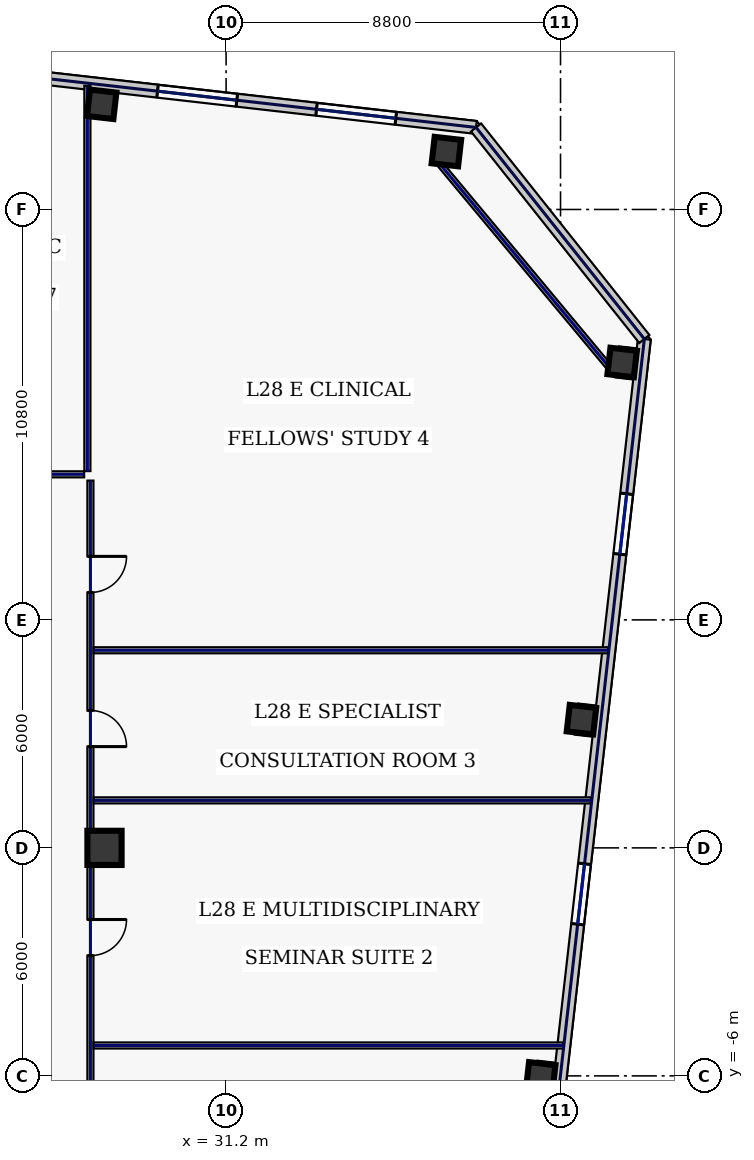
"""IFC4 building model, lengths in metres.
Left out: names, types, materials, properties, quantities, classifications, styles, units other than length and angle.
Written with IfcOpenShell. Run it as: python <this file> out.ifc"""

import sys

from ifc_helpers import new_model, si_unit, direction, frame, frame_2d, origin, origin_2d, place, context, subcontext, project, spatial, rectangle, hollow_rectangle, extrude, element, fill, save


model = new_model("IFC4")
c1 = context("Model", 3, precision=1e-05, world=origin(), true_north=direction((0.0, 1.0)))
c2 = subcontext(c1, "Body", "Model", "MODEL_VIEW")
j1 = project(units=[si_unit("LENGTHUNIT", "METRE"), si_unit("PLANEANGLEUNIT", "RADIAN")], contexts=[c1])
p1 = place(None, origin())
s1 = spatial("IfcSite", under=j1, at=p1, CompositionType="ELEMENT")
p2 = place(p1, origin())
s2 = spatial("IfcBuilding", under=s1, at=p2, CompositionType="ELEMENT")
p3 = place(p2, frame((0.0, 0.0, 125.4)))
s3 = spatial("IfcBuildingStorey", under=s2, at=p3, CompositionType="ELEMENT", Elevation=125.4)
p4 = place(p3, frame((28.0, 0.0, 0.0), z_axis=(0.0, 0.0, 1.0), x_axis=(1.0, 0.0, 0.0)))
e1 = element("IfcColumn", 1, at=p4, inside=s3, PredefinedType="COLUMN", context=c2, shape_type="SweptSolid", body=[
    extrude(hollow_rectangle(XDim=0.9, YDim=0.9, WallThickness=0.04, at=origin_2d()), origin(), (0.0, 0.0, 1.0), 3.74),
])
for number, where, z_axis, x_axis in (
    (2, (36.997, 18.323, 0.0), (0.0, 0.0, 1.0), (0.994, -0.113, 0.0)),
    (3, (27.926, 19.568, 0.0), (0.0, 0.0, 1.0), (0.994, -0.113, 0.0)),
    (4, (39.48, -6.025, 0.0), (0.0, 0.0, 1.0), (0.994, -0.113, 0.0)),
    (5, (40.551, 3.375, 0.0), (0.0, 0.0, 1.0), (0.994, -0.113, 0.0)),
    (6, (41.622, 12.774, 0.0), (0.0, 0.0, 1.0), (0.994, -0.113, 0.0)),
):
    element("IfcColumn", number, at=place(p3, frame(where, z_axis=z_axis, x_axis=x_axis)), inside=s3, PredefinedType="COLUMN", context=c2, shape_type="SweptSolid", body=[
        extrude(hollow_rectangle(XDim=0.7, YDim=0.7, WallThickness=0.032, at=origin_2d()), origin(), (0.0, 0.0, 1.0), 3.74),
    ])
p5 = place(p3, frame((37.777, 18.958, 0.0), z_axis=(0.0, 0.0, 1.0), x_axis=(-0.993571362037, 0.113207546299, 0.0)))
e7 = element("IfcWall", 7, at=p5, inside=s3, PredefinedType="STANDARD", context=c2, shape_type="SweptSolid", body=[
    extrude(rectangle(XDim=21.223, YDim=0.34, at=frame_2d((10.611, 0.0))), origin(), (0.0, 0.0, 1.0), 3.74),
])
p6 = place(p5, frame((15.506, 0.0, 0.67)))
e8 = element("IfcOpeningElement", 8, at=p6, cuts=e7, PredefinedType="OPENING", context=c2, shape_type="SweptSolid", body=[
    extrude(rectangle(XDim=2.1, YDim=2.2, at=frame_2d((1.05, 1.1))), frame((0.0, 0.18, 0.0), z_axis=(0.0, -1.0, 0.0), x_axis=(1.0, 0.0, 0.0)), (0.0, 0.0, 1.0), 0.36),
])
p7 = place(p5, frame((11.285, 0.0, 0.67)))
e9 = element("IfcOpeningElement", 9, at=p7, cuts=e7, PredefinedType="OPENING", context=c2, shape_type="SweptSolid", body=[
    extrude(rectangle(XDim=2.1, YDim=2.2, at=frame_2d((1.05, 1.1))), frame((0.0, 0.18, 0.0), z_axis=(0.0, -1.0, 0.0), x_axis=(1.0, 0.0, 0.0)), (0.0, 0.0, 1.0), 0.36),
])
p8 = place(p5, frame((6.336, 0.0, 0.67)))
e10 = element("IfcOpeningElement", 10, at=p8, cuts=e7, PredefinedType="OPENING", context=c2, shape_type="SweptSolid", body=[
    extrude(rectangle(XDim=2.1, YDim=2.2, at=frame_2d((1.05, 1.1))), frame((0.0, 0.18, 0.0), z_axis=(0.0, -1.0, 0.0), x_axis=(1.0, 0.0, 0.0)), (0.0, 0.0, 1.0), 0.36),
])
p9 = place(p5, frame((2.125, 0.0, 0.67)))
e11 = element("IfcOpeningElement", 11, at=p9, cuts=e7, PredefinedType="OPENING", context=c2, shape_type="SweptSolid", body=[
    extrude(rectangle(XDim=2.1, YDim=2.2, at=frame_2d((1.05, 1.1))), frame((0.0, 0.18, 0.0), z_axis=(0.0, -1.0, 0.0), x_axis=(1.0, 0.0, 0.0)), (0.0, 0.0, 1.0), 0.36),
])
p10 = place(p3, frame((37.768, -25.556, 0.0), z_axis=(0.0, 0.0, 1.0), x_axis=(0.113201605824, 0.993572038877, 0.0)))
e12 = element("IfcWall", 12, at=p10, inside=s3, PredefinedType="STANDARD", context=c2, shape_type="SweptSolid", body=[
    extrude(rectangle(XDim=39.2, YDim=0.34, at=frame_2d((19.6, 0.0))), origin(), (0.0, 0.0, 1.0), 3.74),
])
p11 = place(p10, frame((4.1, 0.0, 0.58)))
e13 = element("IfcOpeningElement", 13, at=p11, cuts=e12, PredefinedType="OPENING", context=c2, shape_type="SweptSolid", body=[
    extrude(rectangle(XDim=1.6, YDim=2.3, at=frame_2d((0.8, 1.15))), frame((0.0, 0.18, 0.0), z_axis=(0.0, -1.0, 0.0), x_axis=(1.0, 0.0, 0.0)), (0.0, 0.0, 1.0), 0.36),
])
p12 = place(p10, frame((13.9, 0.0, 0.58)))
e14 = element("IfcOpeningElement", 14, at=p12, cuts=e12, PredefinedType="OPENING", context=c2, shape_type="SweptSolid", body=[
    extrude(rectangle(XDim=1.6, YDim=2.3, at=frame_2d((0.8, 1.15))), frame((0.0, 0.18, 0.0), z_axis=(0.0, -1.0, 0.0), x_axis=(1.0, 0.0, 0.0)), (0.0, 0.0, 1.0), 0.36),
])
p13 = place(p10, frame((23.7, 0.0, 0.58)))
e15 = element("IfcOpeningElement", 15, at=p13, cuts=e12, PredefinedType="OPENING", context=c2, shape_type="SweptSolid", body=[
    extrude(rectangle(XDim=1.6, YDim=2.3, at=frame_2d((0.8, 1.15))), frame((0.0, 0.18, 0.0), z_axis=(0.0, -1.0, 0.0), x_axis=(1.0, 0.0, 0.0)), (0.0, 0.0, 1.0), 0.36),
])
p14 = place(p10, frame((33.5, 0.0, 0.58)))
e16 = element("IfcOpeningElement", 16, at=p14, cuts=e12, PredefinedType="OPENING", context=c2, shape_type="SweptSolid", body=[
    extrude(rectangle(XDim=1.6, YDim=2.3, at=frame_2d((0.8, 1.15))), frame((0.0, 0.18, 0.0), z_axis=(0.0, -1.0, 0.0), x_axis=(1.0, 0.0, 0.0)), (0.0, 0.0, 1.0), 0.36),
])
p15 = place(p3, frame((42.206, 13.392, 0.0), z_axis=(0.0, 0.0, 1.0), x_axis=(-0.622524521309, 0.782600294128, 0.0)))
e17 = element("IfcWall", 17, at=p15, inside=s3, PredefinedType="STANDARD", context=c2, shape_type="SweptSolid", body=[
    extrude(rectangle(XDim=7.113, YDim=0.34, at=frame_2d((3.557, 0.0))), origin(), (0.0, 0.0, 1.0), 3.74),
])
p16 = place(p3, frame((41.361, 12.556, 0.0), z_axis=(0.0, 0.0, 1.0), x_axis=(-0.640217638562, 0.768193579298, 0.0)))
e18 = element("IfcWall", 18, at=p16, inside=s3, PredefinedType="PARTITIONING", context=c2, shape_type="SweptSolid", body=[
    extrude(rectangle(XDim=7.224, YDim=0.16, at=frame_2d((3.612, 0.0))), origin(), (0.0, 0.0, 1.0), 3.74),
])
p17 = place(p3, frame((-27.465, 9.83, 0.0), z_axis=(0.0, 0.0, 1.0), x_axis=(1.0, 0.0, 0.0)))
e19 = element("IfcWall", 19, at=p17, inside=s3, PredefinedType="PARTITIONING", context=c2, shape_type="SweptSolid", body=[
    extrude(rectangle(XDim=54.93, YDim=0.16, at=frame_2d((27.465, 0.0))), origin(), (0.0, 0.0, 1.0), 3.74),
])
p18 = place(p17, frame((2.044, 0.0, 0.0)))
e20 = element("IfcOpeningElement", 20, at=p18, cuts=e19, PredefinedType="OPENING", context=c2, shape_type="SweptSolid", body=[
    extrude(rectangle(XDim=0.95, YDim=2.2, at=frame_2d((0.475, 1.1))), frame((0.0, 0.09, 0.0), z_axis=(0.0, -1.0, 0.0), x_axis=(1.0, 0.0, 0.0)), (0.0, 0.0, 1.0), 0.18),
])
p19 = place(p17, frame((8.35, 0.0, 0.0)))
e21 = element("IfcOpeningElement", 21, at=p19, cuts=e19, PredefinedType="OPENING", context=c2, shape_type="SweptSolid", body=[
    extrude(rectangle(XDim=1.3, YDim=2.2, at=frame_2d((0.65, 1.1))), frame((0.0, 0.09, 0.0), z_axis=(0.0, -1.0, 0.0), x_axis=(1.0, 0.0, 0.0)), (0.0, 0.0, 1.0), 0.18),
])
p20 = place(p17, frame((15.94, 0.0, 0.0)))
e22 = element("IfcOpeningElement", 22, at=p20, cuts=e19, PredefinedType="OPENING", context=c2, shape_type="SweptSolid", body=[
    extrude(rectangle(XDim=1.3, YDim=2.2, at=frame_2d((0.65, 1.1))), frame((0.0, 0.09, 0.0), z_axis=(0.0, -1.0, 0.0), x_axis=(1.0, 0.0, 0.0)), (0.0, 0.0, 1.0), 0.18),
])
p21 = place(p17, frame((21.815, 0.0, 0.0)))
e23 = element("IfcOpeningElement", 23, at=p21, cuts=e19, PredefinedType="OPENING", context=c2, shape_type="SweptSolid", body=[
    extrude(rectangle(XDim=1.15, YDim=2.2, at=frame_2d((0.575, 1.1))), frame((0.0, 0.09, 0.0), z_axis=(0.0, -1.0, 0.0), x_axis=(1.0, 0.0, 0.0)), (0.0, 0.0, 1.0), 0.18),
])
p22 = place(p17, frame((26.455, 0.0, 0.0)))
e24 = element("IfcOpeningElement", 24, at=p22, cuts=e19, PredefinedType="OPENING", context=c2, shape_type="SweptSolid", body=[
    extrude(rectangle(XDim=0.95, YDim=2.2, at=frame_2d((0.475, 1.1))), frame((0.0, 0.09, 0.0), z_axis=(0.0, -1.0, 0.0), x_axis=(1.0, 0.0, 0.0)), (0.0, 0.0, 1.0), 0.18),
])
p23 = place(p17, frame((32.335, 0.0, 0.0)))
e25 = element("IfcOpeningElement", 25, at=p23, cuts=e19, PredefinedType="OPENING", context=c2, shape_type="SweptSolid", body=[
    extrude(rectangle(XDim=0.95, YDim=2.2, at=frame_2d((0.475, 1.1))), frame((0.0, 0.09, 0.0), z_axis=(0.0, -1.0, 0.0), x_axis=(1.0, 0.0, 0.0)), (0.0, 0.0, 1.0), 0.18),
])
p24 = place(p17, frame((41.255, 0.0, 0.0)))
e26 = element("IfcOpeningElement", 26, at=p24, cuts=e19, PredefinedType="OPENING", context=c2, shape_type="SweptSolid", body=[
    extrude(rectangle(XDim=1.05, YDim=2.2, at=frame_2d((0.525, 1.1))), frame((0.0, 0.09, 0.0), z_axis=(0.0, -1.0, 0.0), x_axis=(1.0, 0.0, 0.0)), (0.0, 0.0, 1.0), 0.18),
])
p25 = place(p17, frame((50.356, 0.0, 0.0)))
e27 = element("IfcOpeningElement", 27, at=p25, cuts=e19, PredefinedType="OPENING", context=c2, shape_type="SweptSolid", body=[
    extrude(rectangle(XDim=0.95, YDim=2.2, at=frame_2d((0.475, 1.1))), frame((0.0, 0.09, 0.0), z_axis=(0.0, -1.0, 0.0), x_axis=(1.0, 0.0, 0.0)), (0.0, 0.0, 1.0), 0.18),
])
p26 = place(p3, frame((27.63, 9.665, 0.0), z_axis=(0.0, 0.0, 1.0), x_axis=(0.0, -1.0, 0.0)))
e28 = element("IfcWall", 28, at=p26, inside=s3, PredefinedType="PARTITIONING", context=c2, shape_type="SweptSolid", body=[
    extrude(rectangle(XDim=19.28, YDim=0.16, at=frame_2d((9.64, 0.0))), origin(), (0.0, 0.0, 1.0), 3.74),
])
p27 = place(p26, frame((16.531, 0.0, 0.0)))
e29 = element("IfcOpeningElement", 29, at=p27, cuts=e28, PredefinedType="OPENING", context=c2, shape_type="SweptSolid", body=[
    extrude(rectangle(XDim=0.95, YDim=2.2, at=frame_2d((0.475, 1.1))), frame((0.0, 0.09, 0.0), z_axis=(0.0, -1.0, 0.0), x_axis=(1.0, 0.0, 0.0)), (0.0, 0.0, 1.0), 0.18),
])
p28 = place(p26, frame((11.55, 0.0, 0.0)))
e30 = element("IfcOpeningElement", 30, at=p28, cuts=e28, PredefinedType="OPENING", context=c2, shape_type="SweptSolid", body=[
    extrude(rectangle(XDim=0.95, YDim=2.2, at=frame_2d((0.475, 1.1))), frame((0.0, 0.09, 0.0), z_axis=(0.0, -1.0, 0.0), x_axis=(1.0, 0.0, 0.0)), (0.0, 0.0, 1.0), 0.18),
])
p29 = place(p26, frame((6.05, 0.0, 0.0)))
e31 = element("IfcOpeningElement", 31, at=p29, cuts=e28, PredefinedType="OPENING", context=c2, shape_type="SweptSolid", body=[
    extrude(rectangle(XDim=0.95, YDim=2.2, at=frame_2d((0.475, 1.1))), frame((0.0, 0.09, 0.0), z_axis=(0.0, -1.0, 0.0), x_axis=(1.0, 0.0, 0.0)), (0.0, 0.0, 1.0), 0.18),
])
p30 = place(p26, frame((1.994, 0.0, 0.0)))
e32 = element("IfcOpeningElement", 32, at=p30, cuts=e28, PredefinedType="OPENING", context=c2, shape_type="SweptSolid", body=[
    extrude(rectangle(XDim=0.95, YDim=2.2, at=frame_2d((0.475, 1.1))), frame((0.0, 0.09, 0.0), z_axis=(0.0, -1.0, 0.0), x_axis=(1.0, 0.0, 0.0)), (0.0, 0.0, 1.0), 0.18),
])
p31 = place(p3, frame((27.55, 9.915, 0.0), z_axis=(0.0, 0.0, 1.0), x_axis=(0.0, 1.0, 0.0)))
e33 = element("IfcWall", 33, at=p31, inside=s3, PredefinedType="PARTITIONING", context=c2, shape_type="SweptSolid", body=[
    extrude(rectangle(XDim=10.138, YDim=0.16, at=frame_2d((5.069, 0.0))), origin(), (0.0, 0.0, 1.0), 3.74),
])
p32 = place(p3, frame((27.715, -5.2, 0.0), z_axis=(0.0, 0.0, 1.0), x_axis=(1.0, 0.0, 0.0)))
e34 = element("IfcWall", 34, at=p32, inside=s3, PredefinedType="PARTITIONING", context=c2, shape_type="SweptSolid", body=[
    extrude(rectangle(XDim=12.352, YDim=0.16, at=frame_2d((6.176, 0.0))), origin(), (0.0, 0.0, 1.0), 3.74),
])
p33 = place(p3, frame((27.715, 1.25, 0.0), z_axis=(0.0, 0.0, 1.0), x_axis=(1.0, 0.0, 0.0)))
e35 = element("IfcWall", 35, at=p33, inside=s3, PredefinedType="PARTITIONING", context=c2, shape_type="SweptSolid", body=[
    extrude(rectangle(XDim=13.087, YDim=0.16, at=frame_2d((6.543, 0.0))), origin(), (0.0, 0.0, 1.0), 3.235),
])
p34 = place(p3, frame((27.715, 5.2, 0.0), z_axis=(0.0, 0.0, 1.0), x_axis=(1.0, 0.0, 0.0)))
e36 = element("IfcWall", 36, at=p34, inside=s3, PredefinedType="PARTITIONING", context=c2, shape_type="SweptSolid", body=[
    extrude(rectangle(XDim=13.537, YDim=0.16, at=frame_2d((6.769, 0.0))), origin(), (0.0, 0.0, 1.0), 3.74),
])
p35 = place(p8, origin())
e37 = element("IfcWindow", 37, at=p35, inside=s3, PartitioningType="SINGLE_PANEL", PredefinedType="WINDOW", context=c2, shape_type="SweptSolid", body=[
    extrude(rectangle(XDim=2.1, YDim=2.2, at=frame_2d((1.05, 1.1))), frame((0.0, 0.03, 0.0), z_axis=(0.0, -1.0, 0.0), x_axis=(1.0, 0.0, 0.0)), (0.0, 0.0, 1.0), 0.06),
])
fill(e10, e37)
p36 = place(p9, origin())
e38 = element("IfcWindow", 38, at=p36, inside=s3, PartitioningType="SINGLE_PANEL", PredefinedType="WINDOW", context=c2, shape_type="SweptSolid", body=[
    extrude(rectangle(XDim=2.1, YDim=2.2, at=frame_2d((1.05, 1.1))), frame((0.0, 0.03, 0.0), z_axis=(0.0, -1.0, 0.0), x_axis=(1.0, 0.0, 0.0)), (0.0, 0.0, 1.0), 0.06),
])
fill(e11, e38)
p37 = place(p13, origin())
e39 = element("IfcWindow", 39, at=p37, inside=s3, PartitioningType="SINGLE_PANEL", PredefinedType="WINDOW", context=c2, shape_type="SweptSolid", body=[
    extrude(rectangle(XDim=1.6, YDim=2.3, at=frame_2d((0.8, 1.15))), frame((0.0, 0.03, 0.0), z_axis=(0.0, -1.0, 0.0), x_axis=(1.0, 0.0, 0.0)), (0.0, 0.0, 1.0), 0.06),
])
fill(e15, e39)
p38 = place(p14, origin())
e40 = element("IfcWindow", 40, at=p38, inside=s3, PartitioningType="SINGLE_PANEL", PredefinedType="WINDOW", context=c2, shape_type="SweptSolid", body=[
    extrude(rectangle(XDim=1.6, YDim=2.3, at=frame_2d((0.8, 1.15))), frame((0.0, 0.03, 0.0), z_axis=(0.0, -1.0, 0.0), x_axis=(1.0, 0.0, 0.0)), (0.0, 0.0, 1.0), 0.06),
])
fill(e16, e40)
p39 = place(p28, origin())
e41 = element("IfcDoor", 41, at=p39, inside=s3, OperationType="SINGLE_SWING_LEFT", PredefinedType="DOOR", context=c2, shape_type="SweptSolid", body=[
    extrude(rectangle(XDim=0.95, YDim=2.2, at=frame_2d((0.475, 1.1))), frame((0.0, 0.025, 0.0), z_axis=(0.0, -1.0, 0.0), x_axis=(1.0, 0.0, 0.0)), (0.0, 0.0, 1.0), 0.05),
])
fill(e30, e41)
p40 = place(p29, origin())
e42 = element("IfcDoor", 42, at=p40, inside=s3, OperationType="SINGLE_SWING_RIGHT", PredefinedType="DOOR", context=c2, shape_type="SweptSolid", body=[
    extrude(rectangle(XDim=0.95, YDim=2.2, at=frame_2d((0.475, 1.1))), frame((0.0, 0.025, 0.0), z_axis=(0.0, -1.0, 0.0), x_axis=(1.0, 0.0, 0.0)), (0.0, 0.0, 1.0), 0.05),
])
fill(e31, e42)
p41 = place(p30, origin())
e43 = element("IfcDoor", 43, at=p41, inside=s3, OperationType="SINGLE_SWING_LEFT", PredefinedType="DOOR", context=c2, shape_type="SweptSolid", body=[
    extrude(rectangle(XDim=0.95, YDim=2.2, at=frame_2d((0.475, 1.1))), frame((0.0, 0.025, 0.0), z_axis=(0.0, -1.0, 0.0), x_axis=(1.0, 0.0, 0.0)), (0.0, 0.0, 1.0), 0.05),
])
fill(e32, e43)
save(model, sys.argv[1])
